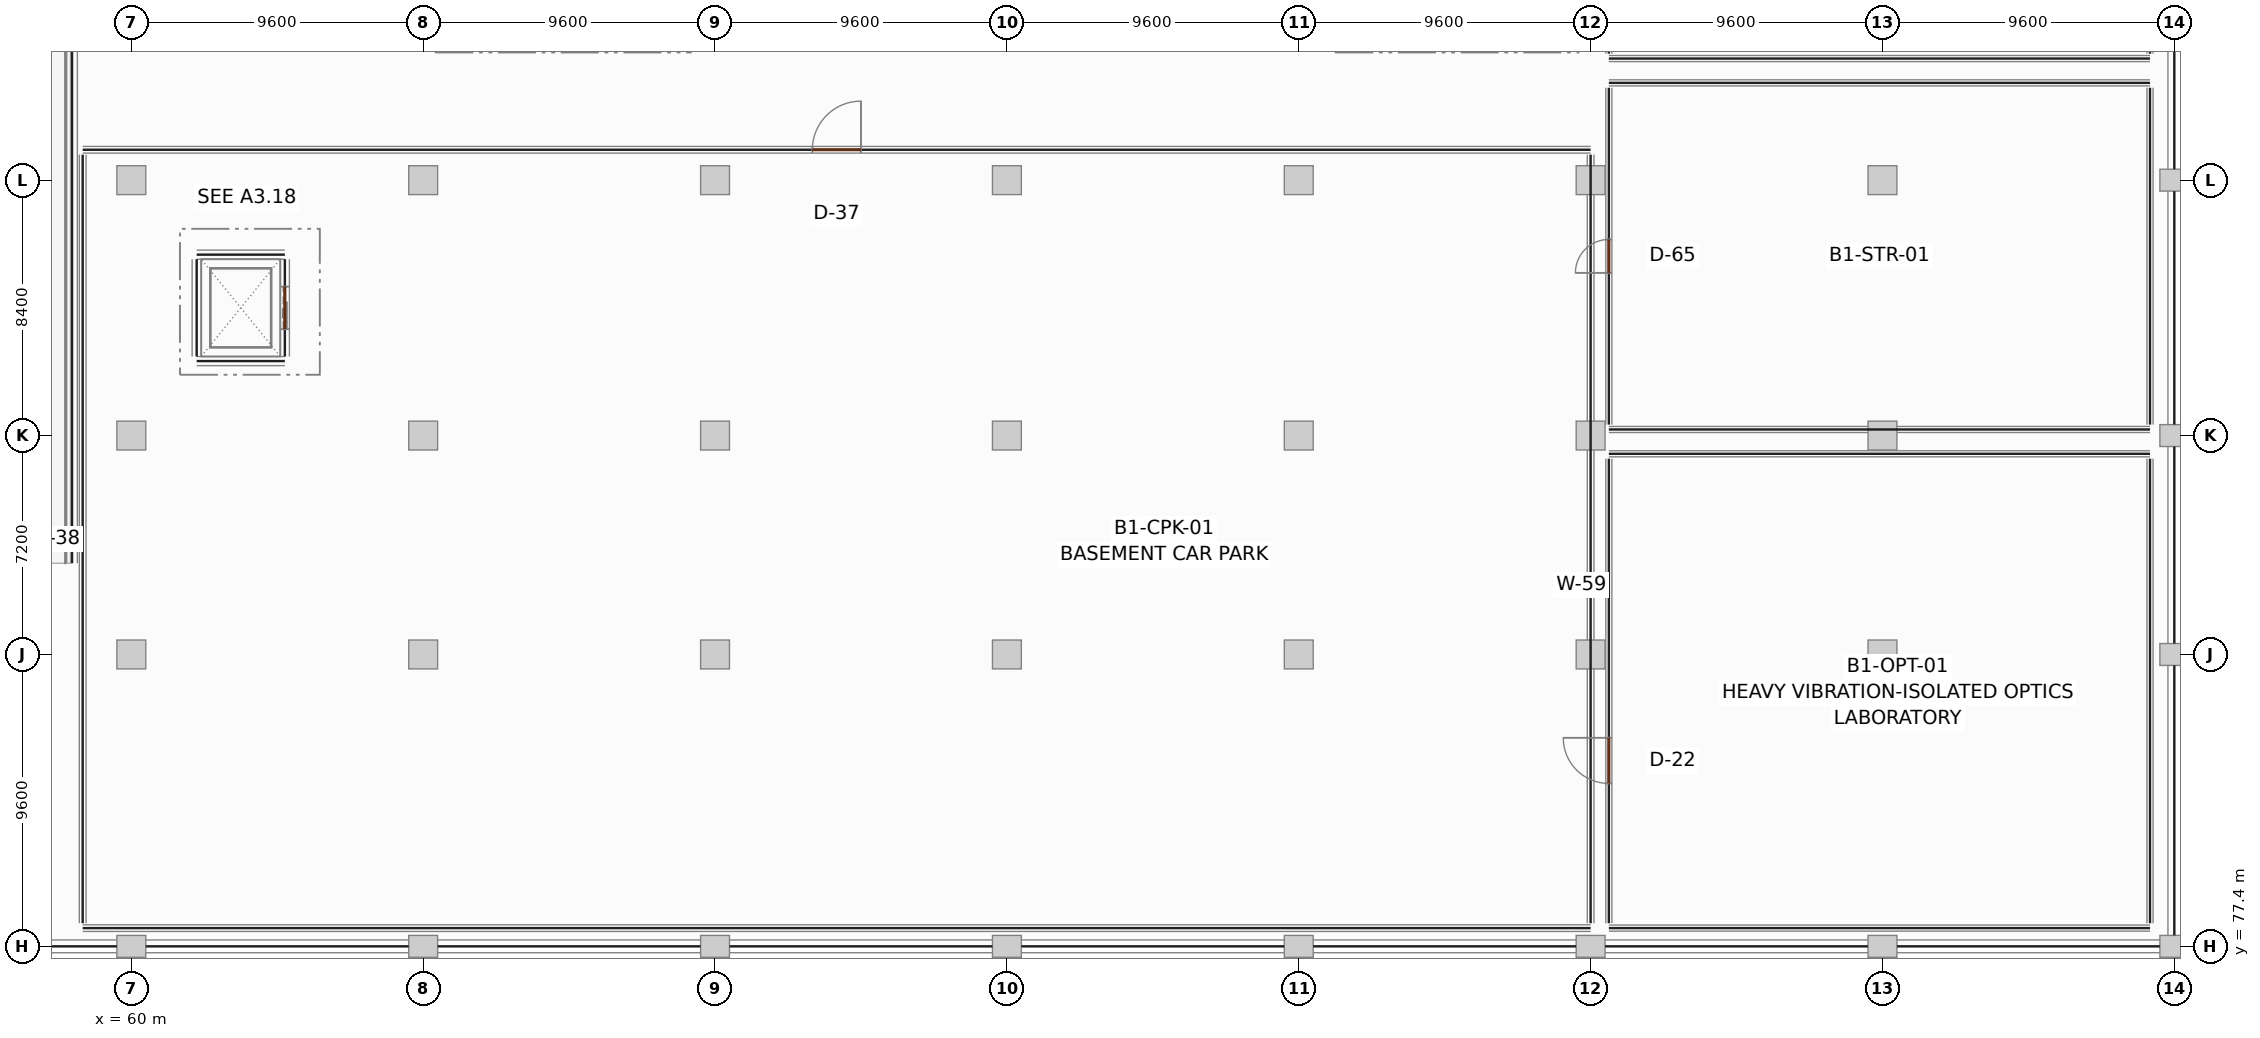
"""IFC4 building model, lengths in metres.
Left out: names, types, materials, properties, quantities, classifications, styles, units other than length and angle.
Written with IfcOpenShell. Run it as: python <this file> out.ifc"""

import sys

from ifc_helpers import new_model, si_unit, direction, frame, frame_2d, origin, origin_2d, place, context, subcontext, project, spatial, polyline, rectangle, outline, extrude, element, fill, save


model = new_model("IFC4")
c1 = context("Model", 3, precision=1e-05, world=origin(), true_north=direction((0.0, 1.0)))
c2 = subcontext(c1, "Body", "Model", "MODEL_VIEW")
j1 = project(units=[si_unit("LENGTHUNIT", "METRE"), si_unit("PLANEANGLEUNIT", "RADIAN")], contexts=[c1])
p1 = place(None, origin())
s1 = spatial("IfcSite", under=j1, at=p1, CompositionType="ELEMENT")
p2 = place(p1, origin())
s2 = spatial("IfcBuilding", under=s1, at=p2, CompositionType="ELEMENT")
p3 = place(p2, frame((0.0, 0.0, -4.5)))
s3 = spatial("IfcBuildingStorey", under=s2, at=p3, CompositionType="ELEMENT", Elevation=-4.5)
p4 = place(p3, frame((58.05, 90.0, 0.0), z_axis=(0.0, 0.0, 1.0), x_axis=(0.0, 1.0, 0.0)))
e1 = element("IfcWall", 1, at=p4, inside=s3, PredefinedType="SHEAR", context=c2, shape_type="SweptSolid", body=[
    extrude(outline(polyline([(0.0, 0.0), (27.0, 0.0), (27.0, 4.12), (0.0, 0.0), (0.0, 0.0)])), frame((0.0, 0.175, 0.0), z_axis=(0.0, -1.0, 0.0), x_axis=(1.0, 0.0, 0.0)), (0.0, 0.0, 1.0), 0.35),
])
p5 = place(p3, frame((60.0, 77.4, 0.0), z_axis=(0.0, 0.0, 1.0), x_axis=(1.0, 0.0, 0.0)))
e2 = element("IfcColumn", 2, at=p5, inside=s3, PredefinedType="COLUMN", context=c2, shape_type="SweptSolid", body=[
    extrude(rectangle(XDim=0.95, YDim=0.72, at=origin_2d()), origin(), (0.0, 0.0, 1.0), 4.14),
])
for number, where, z_axis, x_axis in (
    (3, (60.0, 87.0, 0.0), (0.0, 0.0, 1.0), (1.0, 0.0, 0.0)),
    (4, (60.0, 94.2, 0.0), (0.0, 0.0, 1.0), (1.0, 0.0, 0.0)),
    (5, (60.0, 102.6, 0.0), (0.0, 0.0, 1.0), (1.0, 0.0, 0.0)),
):
    element("IfcColumn", number, at=place(p3, frame(where, z_axis=z_axis, x_axis=x_axis)), inside=s3, PredefinedType="COLUMN", context=c2, shape_type="SweptSolid", body=[
        extrude(rectangle(XDim=0.95, YDim=0.95, at=origin_2d()), origin(), (0.0, 0.0, 1.0), 4.14),
    ])
p6 = place(p3, frame((69.6, 77.4, 0.0), z_axis=(0.0, 0.0, 1.0), x_axis=(1.0, 0.0, 0.0)))
e6 = element("IfcColumn", 6, at=p6, inside=s3, PredefinedType="COLUMN", context=c2, shape_type="SweptSolid", body=[
    extrude(rectangle(XDim=0.95, YDim=0.72, at=origin_2d()), origin(), (0.0, 0.0, 1.0), 4.14),
])
for number, where, z_axis, x_axis in (
    (7, (69.6, 87.0, 0.0), (0.0, 0.0, 1.0), (1.0, 0.0, 0.0)),
    (8, (69.6, 94.2, 0.0), (0.0, 0.0, 1.0), (1.0, 0.0, 0.0)),
    (9, (69.6, 102.6, 0.0), (0.0, 0.0, 1.0), (1.0, 0.0, 0.0)),
):
    element("IfcColumn", number, at=place(p3, frame(where, z_axis=z_axis, x_axis=x_axis)), inside=s3, PredefinedType="COLUMN", context=c2, shape_type="SweptSolid", body=[
        extrude(rectangle(XDim=0.95, YDim=0.95, at=origin_2d()), origin(), (0.0, 0.0, 1.0), 4.14),
    ])
p7 = place(p3, frame((79.2, 77.4, 0.0), z_axis=(0.0, 0.0, 1.0), x_axis=(1.0, 0.0, 0.0)))
e10 = element("IfcColumn", 10, at=p7, inside=s3, PredefinedType="COLUMN", context=c2, shape_type="SweptSolid", body=[
    extrude(rectangle(XDim=0.95, YDim=0.72, at=origin_2d()), origin(), (0.0, 0.0, 1.0), 4.14),
])
for number, where, z_axis, x_axis in (
    (11, (79.2, 87.0, 0.0), (0.0, 0.0, 1.0), (1.0, 0.0, 0.0)),
    (12, (79.2, 94.2, 0.0), (0.0, 0.0, 1.0), (1.0, 0.0, 0.0)),
    (13, (79.2, 102.6, 0.0), (0.0, 0.0, 1.0), (1.0, 0.0, 0.0)),
):
    element("IfcColumn", number, at=place(p3, frame(where, z_axis=z_axis, x_axis=x_axis)), inside=s3, PredefinedType="COLUMN", context=c2, shape_type="SweptSolid", body=[
        extrude(rectangle(XDim=0.95, YDim=0.95, at=origin_2d()), origin(), (0.0, 0.0, 1.0), 4.14),
    ])
p8 = place(p3, frame((88.8, 77.4, 0.0), z_axis=(0.0, 0.0, 1.0), x_axis=(1.0, 0.0, 0.0)))
e14 = element("IfcColumn", 14, at=p8, inside=s3, PredefinedType="COLUMN", context=c2, shape_type="SweptSolid", body=[
    extrude(rectangle(XDim=0.95, YDim=0.72, at=origin_2d()), origin(), (0.0, 0.0, 1.0), 4.14),
])
for number, where, z_axis, x_axis in (
    (15, (88.8, 87.0, 0.0), (0.0, 0.0, 1.0), (1.0, 0.0, 0.0)),
    (16, (88.8, 94.2, 0.0), (0.0, 0.0, 1.0), (1.0, 0.0, 0.0)),
    (17, (88.8, 102.6, 0.0), (0.0, 0.0, 1.0), (1.0, 0.0, 0.0)),
):
    element("IfcColumn", number, at=place(p3, frame(where, z_axis=z_axis, x_axis=x_axis)), inside=s3, PredefinedType="COLUMN", context=c2, shape_type="SweptSolid", body=[
        extrude(rectangle(XDim=0.95, YDim=0.95, at=origin_2d()), origin(), (0.0, 0.0, 1.0), 4.14),
    ])
p9 = place(p3, frame((98.4, 77.4, 0.0), z_axis=(0.0, 0.0, 1.0), x_axis=(1.0, 0.0, 0.0)))
e18 = element("IfcColumn", 18, at=p9, inside=s3, PredefinedType="COLUMN", context=c2, shape_type="SweptSolid", body=[
    extrude(rectangle(XDim=0.95, YDim=0.72, at=origin_2d()), origin(), (0.0, 0.0, 1.0), 4.14),
])
for number, where, z_axis, x_axis in (
    (19, (98.4, 87.0, 0.0), (0.0, 0.0, 1.0), (1.0, 0.0, 0.0)),
    (20, (98.4, 94.2, 0.0), (0.0, 0.0, 1.0), (1.0, 0.0, 0.0)),
    (21, (98.4, 102.6, 0.0), (0.0, 0.0, 1.0), (1.0, 0.0, 0.0)),
):
    element("IfcColumn", number, at=place(p3, frame(where, z_axis=z_axis, x_axis=x_axis)), inside=s3, PredefinedType="COLUMN", context=c2, shape_type="SweptSolid", body=[
        extrude(rectangle(XDim=0.95, YDim=0.95, at=origin_2d()), origin(), (0.0, 0.0, 1.0), 4.14),
    ])
p10 = place(p3, frame((108.0, 77.4, 0.0), z_axis=(0.0, 0.0, 1.0), x_axis=(1.0, 0.0, 0.0)))
e22 = element("IfcColumn", 22, at=p10, inside=s3, PredefinedType="COLUMN", context=c2, shape_type="SweptSolid", body=[
    extrude(rectangle(XDim=0.95, YDim=0.72, at=origin_2d()), origin(), (0.0, 0.0, 1.0), 4.14),
])
for number, where, z_axis, x_axis in (
    (23, (108.0, 87.0, 0.0), (0.0, 0.0, 1.0), (1.0, 0.0, 0.0)),
    (24, (108.0, 94.2, 0.0), (0.0, 0.0, 1.0), (1.0, 0.0, 0.0)),
    (25, (108.0, 102.6, 0.0), (0.0, 0.0, 1.0), (1.0, 0.0, 0.0)),
):
    element("IfcColumn", number, at=place(p3, frame(where, z_axis=z_axis, x_axis=x_axis)), inside=s3, PredefinedType="COLUMN", context=c2, shape_type="SweptSolid", body=[
        extrude(rectangle(XDim=0.95, YDim=0.95, at=origin_2d()), origin(), (0.0, 0.0, 1.0), 4.14),
    ])
p11 = place(p3, frame((117.6, 77.4, 0.0), z_axis=(0.0, 0.0, 1.0), x_axis=(1.0, 0.0, 0.0)))
e26 = element("IfcColumn", 26, at=p11, inside=s3, PredefinedType="COLUMN", context=c2, shape_type="SweptSolid", body=[
    extrude(rectangle(XDim=0.95, YDim=0.72, at=origin_2d()), origin(), (0.0, 0.0, 1.0), 4.14),
])
for number, where, z_axis, x_axis in (
    (27, (117.6, 87.0, 0.0), (0.0, 0.0, 1.0), (1.0, 0.0, 0.0)),
    (28, (117.6, 94.2, 0.0), (0.0, 0.0, 1.0), (1.0, 0.0, 0.0)),
    (29, (117.6, 102.6, 0.0), (0.0, 0.0, 1.0), (1.0, 0.0, 0.0)),
):
    element("IfcColumn", number, at=place(p3, frame(where, z_axis=z_axis, x_axis=x_axis)), inside=s3, PredefinedType="COLUMN", context=c2, shape_type="SweptSolid", body=[
        extrude(rectangle(XDim=0.95, YDim=0.95, at=origin_2d()), origin(), (0.0, 0.0, 1.0), 4.14),
    ])
for number, where, z_axis, x_axis in (
    (30, (127.2, 77.4, 0.0), (0.0, 0.0, 1.0), (1.0, 0.0, 0.0)),
    (31, (127.2, 87.0, 0.0), (0.0, 0.0, 1.0), (1.0, 0.0, 0.0)),
):
    element("IfcColumn", number, at=place(p3, frame(where, z_axis=z_axis, x_axis=x_axis)), inside=s3, PredefinedType="COLUMN", context=c2, shape_type="SweptSolid", body=[
        extrude(rectangle(XDim=0.95, YDim=0.72, at=origin_2d()), origin(), (0.0, 0.0, 1.0), 4.14),
    ])
for number, where, z_axis, x_axis in (
    (32, (127.2, 94.2, 0.0), (0.0, 0.0, 1.0), (1.0, 0.0, 0.0)),
    (33, (127.2, 102.6, 0.0), (0.0, 0.0, 1.0), (1.0, 0.0, 0.0)),
):
    element("IfcColumn", number, at=place(p3, frame(where, z_axis=z_axis, x_axis=x_axis)), inside=s3, PredefinedType="COLUMN", context=c2, shape_type="SweptSolid", body=[
        extrude(rectangle(XDim=0.95, YDim=0.72, at=origin_2d()), origin(), (0.0, 0.0, 1.0), 4.28),
    ])
p12 = place(p3, frame((127.2, 77.762, 0.0), z_axis=(0.0, 0.0, 1.0), x_axis=(0.0, 1.0, 0.0)))
e34 = element("IfcWall", 34, at=p12, inside=s3, PredefinedType="SOLIDWALL", context=c2, shape_type="SweptSolid", body=[
    extrude(rectangle(XDim=8.876, YDim=0.42, at=frame_2d((4.438, 0.0))), origin(), (0.0, 0.0, 1.0), 4.135),
])
p13 = place(p3, frame((127.2, 87.362, 0.0), z_axis=(0.0, 0.0, 1.0), x_axis=(0.0, 1.0, 0.0)))
e35 = element("IfcWall", 35, at=p13, inside=s3, PredefinedType="SOLIDWALL", context=c2, shape_type="SweptSolid", body=[
    extrude(rectangle(XDim=6.476, YDim=0.42, at=frame_2d((3.238, 0.0))), origin(), (0.0, 0.0, 1.0), 4.135),
])
for number, where, z_axis, x_axis in (
    (36, (127.2, 94.562, 0.0), (0.0, 0.0, 1.0), (0.0, 1.0, 0.0)),
    (37, (127.2, 102.962, 0.0), (0.0, 0.0, 1.0), (0.0, 1.0, 0.0)),
):
    element("IfcWall", number, at=place(p3, frame(where, z_axis=z_axis, x_axis=x_axis)), inside=s3, PredefinedType="SOLIDWALL", context=c2, shape_type="SweptSolid", body=[
        extrude(rectangle(XDim=7.676, YDim=0.42, at=frame_2d((3.838, 0.0))), origin(), (0.0, 0.0, 1.0), 4.135),
    ])
for number, where, z_axis, x_axis in (
    (38, (50.877, 77.4, 0.0), (0.0, 0.0, 1.0), (1.0, 0.0, 0.0)),
    (39, (60.477, 77.4, 0.0), (0.0, 0.0, 1.0), (1.0, 0.0, 0.0)),
    (40, (70.077, 77.4, 0.0), (0.0, 0.0, 1.0), (1.0, 0.0, 0.0)),
    (41, (79.677, 77.4, 0.0), (0.0, 0.0, 1.0), (1.0, 0.0, 0.0)),
    (42, (89.277, 77.4, 0.0), (0.0, 0.0, 1.0), (1.0, 0.0, 0.0)),
    (43, (98.877, 77.4, 0.0), (0.0, 0.0, 1.0), (1.0, 0.0, 0.0)),
    (44, (108.477, 77.4, 0.0), (0.0, 0.0, 1.0), (1.0, 0.0, 0.0)),
    (45, (118.077, 77.4, 0.0), (0.0, 0.0, 1.0), (1.0, 0.0, 0.0)),
):
    element("IfcWall", number, at=place(p3, frame(where, z_axis=z_axis, x_axis=x_axis)), inside=s3, PredefinedType="SOLIDWALL", context=c2, shape_type="SweptSolid", body=[
        extrude(rectangle(XDim=8.646, YDim=0.42, at=frame_2d((4.323, 0.0))), origin(), (0.0, 0.0, 1.0), 4.135),
    ])
for number, where, z_axis, x_axis in (
    (46, (62.15, 96.65, 0.0), (0.0, 0.0, 1.0), (1.0, 0.0, 0.0)),
    (47, (62.15, 100.15, 0.0), (0.0, 0.0, 1.0), (1.0, 0.0, 0.0)),
):
    element("IfcWall", number, at=place(p3, frame(where, z_axis=z_axis, x_axis=x_axis)), inside=s3, PredefinedType="SHEAR", context=c2, shape_type="SweptSolid", body=[
        extrude(rectangle(XDim=2.9, YDim=0.3, at=frame_2d((1.45, 0.0))), origin(), (0.0, 0.0, 1.0), 4.14),
    ])
p14 = place(p3, frame((62.15, 96.8, 0.0), z_axis=(0.0, 0.0, 1.0), x_axis=(0.0, 1.0, 0.0)))
e48 = element("IfcWall", 48, at=p14, inside=s3, PredefinedType="SHEAR", context=c2, shape_type="SweptSolid", body=[
    extrude(rectangle(XDim=3.2, YDim=0.3, at=frame_2d((1.6, 0.0))), origin(), (0.0, 0.0, 1.0), 4.14),
])
p15 = place(p3, frame((65.05, 96.8, 0.0), z_axis=(0.0, 0.0, 1.0), x_axis=(0.0, 1.0, 0.0)))
e49 = element("IfcWall", 49, at=p15, inside=s3, PredefinedType="SHEAR", context=c2, shape_type="SweptSolid", body=[
    extrude(rectangle(XDim=3.2, YDim=0.3, at=frame_2d((1.6, 0.0))), origin(), (0.0, 0.0, 1.0), 4.14),
])
p16 = place(p15, frame((0.9, 0.0, 0.0)))
e50 = element("IfcOpeningElement", 50, at=p16, cuts=e49, PredefinedType="OPENING", context=c2, shape_type="SweptSolid", body=[
    extrude(rectangle(XDim=1.4, YDim=2.3, at=frame_2d((0.7, 1.15))), frame((0.0, 0.16, 0.0), z_axis=(0.0, -1.0, 0.0), x_axis=(1.0, 0.0, 0.0)), (0.0, 0.0, 1.0), 0.32),
])
for number, where, z_axis, x_axis in (
    (51, (108.6, 78.0, 0.0), (0.0, 0.0, 1.0), (1.0, 0.0, 0.0)),
    (52, (108.6, 93.6, 0.0), (0.0, 0.0, 1.0), (1.0, 0.0, 0.0)),
):
    element("IfcWall", number, at=place(p3, frame(where, z_axis=z_axis, x_axis=x_axis)), inside=s3, PredefinedType="PARTITIONING", context=c2, shape_type="SweptSolid", body=[
        extrude(rectangle(XDim=17.8, YDim=0.2, at=frame_2d((8.9, 0.0))), origin(), (0.0, 0.0, 1.0), 3.22),
    ])
p17 = place(p3, frame((108.6, 78.16, 0.0), z_axis=(0.0, 0.0, 1.0), x_axis=(0.0, 1.0, 0.0)))
e53 = element("IfcWall", 53, at=p17, inside=s3, PredefinedType="PARTITIONING", context=c2, shape_type="SweptSolid", body=[
    extrude(rectangle(XDim=15.28, YDim=0.2, at=frame_2d((7.64, 0.0))), origin(), (0.0, 0.0, 1.0), 3.22),
])
p18 = place(p17, frame((4.598, 0.0, 0.0)))
e54 = element("IfcOpeningElement", 54, at=p18, cuts=e53, PredefinedType="OPENING", context=c2, shape_type="SweptSolid", body=[
    extrude(rectangle(XDim=1.5, YDim=2.2, at=frame_2d((0.75, 1.1))), frame((0.0, 0.11, 0.0), z_axis=(0.0, -1.0, 0.0), x_axis=(1.0, 0.0, 0.0)), (0.0, 0.0, 1.0), 0.22),
])
p19 = place(p3, frame((126.4, 78.16, 0.0), z_axis=(0.0, 0.0, 1.0), x_axis=(0.0, 1.0, 0.0)))
e55 = element("IfcWall", 55, at=p19, inside=s3, PredefinedType="PARTITIONING", context=c2, shape_type="SweptSolid", body=[
    extrude(rectangle(XDim=15.28, YDim=0.2, at=frame_2d((7.64, 0.0))), origin(), (0.0, 0.0, 1.0), 3.22),
])
for number, where, z_axis, x_axis in (
    (56, (108.6, 94.4, 0.0), (0.0, 0.0, 1.0), (1.0, 0.0, 0.0)),
    (57, (108.6, 105.8, 0.0), (0.0, 0.0, 1.0), (1.0, 0.0, 0.0)),
):
    element("IfcWall", number, at=place(p3, frame(where, z_axis=z_axis, x_axis=x_axis)), inside=s3, PredefinedType="PARTITIONING", context=c2, shape_type="SweptSolid", body=[
        extrude(rectangle(XDim=17.8, YDim=0.2, at=frame_2d((8.9, 0.0))), origin(), (0.0, 0.0, 1.0), 3.22),
    ])
p20 = place(p3, frame((108.6, 94.56, 0.0), z_axis=(0.0, 0.0, 1.0), x_axis=(0.0, 1.0, 0.0)))
e58 = element("IfcWall", 58, at=p20, inside=s3, PredefinedType="PARTITIONING", context=c2, shape_type="SweptSolid", body=[
    extrude(rectangle(XDim=11.08, YDim=0.2, at=frame_2d((5.54, 0.0))), origin(), (0.0, 0.0, 1.0), 3.22),
])
p21 = place(p20, frame((4.99, 0.0, 0.0)))
e59 = element("IfcOpeningElement", 59, at=p21, cuts=e58, PredefinedType="OPENING", context=c2, shape_type="SweptSolid", body=[
    extrude(rectangle(XDim=1.1, YDim=2.2, at=frame_2d((0.55, 1.1))), frame((0.0, 0.11, 0.0), z_axis=(0.0, -1.0, 0.0), x_axis=(1.0, 0.0, 0.0)), (0.0, 0.0, 1.0), 0.22),
])
p22 = place(p3, frame((126.4, 94.56, 0.0), z_axis=(0.0, 0.0, 1.0), x_axis=(0.0, 1.0, 0.0)))
e60 = element("IfcWall", 60, at=p22, inside=s3, PredefinedType="PARTITIONING", context=c2, shape_type="SweptSolid", body=[
    extrude(rectangle(XDim=11.08, YDim=0.2, at=frame_2d((5.54, 0.0))), origin(), (0.0, 0.0, 1.0), 3.22),
])
p23 = place(p3, frame((108.6, 106.6, 0.0), z_axis=(0.0, 0.0, 1.0), x_axis=(1.0, 0.0, 0.0)))
e61 = element("IfcWall", 61, at=p23, inside=s3, PredefinedType="PARTITIONING", context=c2, shape_type="SweptSolid", body=[
    extrude(rectangle(XDim=17.8, YDim=0.2, at=frame_2d((8.9, 0.0))), origin(), (0.0, 0.0, 1.0), 3.22),
])
p24 = place(p3, frame((108.6, 106.76, 0.0), z_axis=(0.0, 0.0, 1.0), x_axis=(0.0, 1.0, 0.0)))
e62 = element("IfcWall", 62, at=p24, inside=s3, PredefinedType="PARTITIONING", context=c2, shape_type="SweptSolid", body=[
    extrude(rectangle(XDim=11.88, YDim=0.2, at=frame_2d((5.94, 0.0))), origin(), (0.0, 0.0, 1.0), 3.22),
])
p25 = place(p24, frame((5.14, 0.0, 0.0)))
e63 = element("IfcOpeningElement", 63, at=p25, cuts=e62, PredefinedType="OPENING", context=c2, shape_type="SweptSolid", body=[
    extrude(rectangle(XDim=1.6, YDim=2.3, at=frame_2d((0.8, 1.15))), frame((0.0, 0.11, 0.0), z_axis=(0.0, -1.0, 0.0), x_axis=(1.0, 0.0, 0.0)), (0.0, 0.0, 1.0), 0.22),
])
p26 = place(p3, frame((126.4, 106.76, 0.0), z_axis=(0.0, 0.0, 1.0), x_axis=(0.0, 1.0, 0.0)))
e64 = element("IfcWall", 64, at=p26, inside=s3, PredefinedType="PARTITIONING", context=c2, shape_type="SweptSolid", body=[
    extrude(rectangle(XDim=11.88, YDim=0.2, at=frame_2d((5.94, 0.0))), origin(), (0.0, 0.0, 1.0), 3.22),
])
p27 = place(p3, frame((58.4, 78.0, 0.0), z_axis=(0.0, 0.0, 1.0), x_axis=(1.0, 0.0, 0.0)))
e65 = element("IfcWall", 65, at=p27, inside=s3, PredefinedType="PARTITIONING", context=c2, shape_type="SweptSolid", body=[
    extrude(rectangle(XDim=49.6, YDim=0.22, at=frame_2d((24.8, 0.0))), origin(), (0.0, 0.0, 1.0), 3.22),
])
p28 = place(p3, frame((58.4, 103.6, 0.0), z_axis=(0.0, 0.0, 1.0), x_axis=(1.0, 0.0, 0.0)))
e66 = element("IfcWall", 66, at=p28, inside=s3, PredefinedType="PARTITIONING", context=c2, shape_type="SweptSolid", body=[
    extrude(rectangle(XDim=49.6, YDim=0.22, at=frame_2d((24.8, 0.0))), origin(), (0.0, 0.0, 1.0), 3.22),
])
p29 = place(p28, frame((24.0, 0.0, 0.0)))
e67 = element("IfcOpeningElement", 67, at=p29, cuts=e66, PredefinedType="OPENING", context=c2, shape_type="SweptSolid", body=[
    extrude(rectangle(XDim=1.6, YDim=2.3, at=frame_2d((0.8, 1.15))), frame((0.0, 0.12, 0.0), z_axis=(0.0, -1.0, 0.0), x_axis=(1.0, 0.0, 0.0)), (0.0, 0.0, 1.0), 0.24),
])
for number, where, z_axis, x_axis in (
    (68, (58.4, 78.16, 0.0), (0.0, 0.0, 1.0), (0.0, 1.0, 0.0)),
    (69, (108.0, 78.16, 0.0), (0.0, 0.0, 1.0), (0.0, 1.0, 0.0)),
):
    element("IfcWall", number, at=place(p3, frame(where, z_axis=z_axis, x_axis=x_axis)), inside=s3, PredefinedType="PARTITIONING", context=c2, shape_type="SweptSolid", body=[
        extrude(rectangle(XDim=25.28, YDim=0.22, at=frame_2d((12.64, 0.0))), origin(), (0.0, 0.0, 1.0), 3.22),
    ])
p30 = place(p16, origin())
e70 = element("IfcDoor", 70, at=p30, inside=s3, OperationType="SLIDING_TO_LEFT", PredefinedType="DOOR", context=c2, shape_type="SweptSolid", body=[
    extrude(rectangle(XDim=1.4, YDim=2.3, at=frame_2d((0.7, 1.15))), frame((0.0, 0.025, 0.0), z_axis=(0.0, -1.0, 0.0), x_axis=(1.0, 0.0, 0.0)), (0.0, 0.0, 1.0), 0.05),
])
fill(e50, e70)
p31 = place(p18, origin())
e71 = element("IfcDoor", 71, at=p31, inside=s3, OperationType="SINGLE_SWING_RIGHT", PredefinedType="DOOR", context=c2, shape_type="SweptSolid", body=[
    extrude(rectangle(XDim=1.5, YDim=2.2, at=frame_2d((0.75, 1.1))), frame((0.0, 0.025, 0.0), z_axis=(0.0, -1.0, 0.0), x_axis=(1.0, 0.0, 0.0)), (0.0, 0.0, 1.0), 0.05),
])
fill(e54, e71)
p32 = place(p21, origin())
e72 = element("IfcDoor", 72, at=p32, inside=s3, OperationType="SINGLE_SWING_LEFT", PredefinedType="DOOR", context=c2, shape_type="SweptSolid", body=[
    extrude(rectangle(XDim=1.1, YDim=2.2, at=frame_2d((0.55, 1.1))), frame((0.0, 0.025, 0.0), z_axis=(0.0, -1.0, 0.0), x_axis=(1.0, 0.0, 0.0)), (0.0, 0.0, 1.0), 0.05),
])
fill(e59, e72)
p33 = place(p29, origin())
e73 = element("IfcDoor", 73, at=p33, inside=s3, OperationType="SINGLE_SWING_RIGHT", PredefinedType="DOOR", context=c2, shape_type="SweptSolid", body=[
    extrude(rectangle(XDim=1.6, YDim=2.3, at=frame_2d((0.8, 1.15))), frame((0.0, 0.025, 0.0), z_axis=(0.0, -1.0, 0.0), x_axis=(1.0, 0.0, 0.0)), (0.0, 0.0, 1.0), 0.05),
])
fill(e67, e73)
save(model, sys.argv[1])
